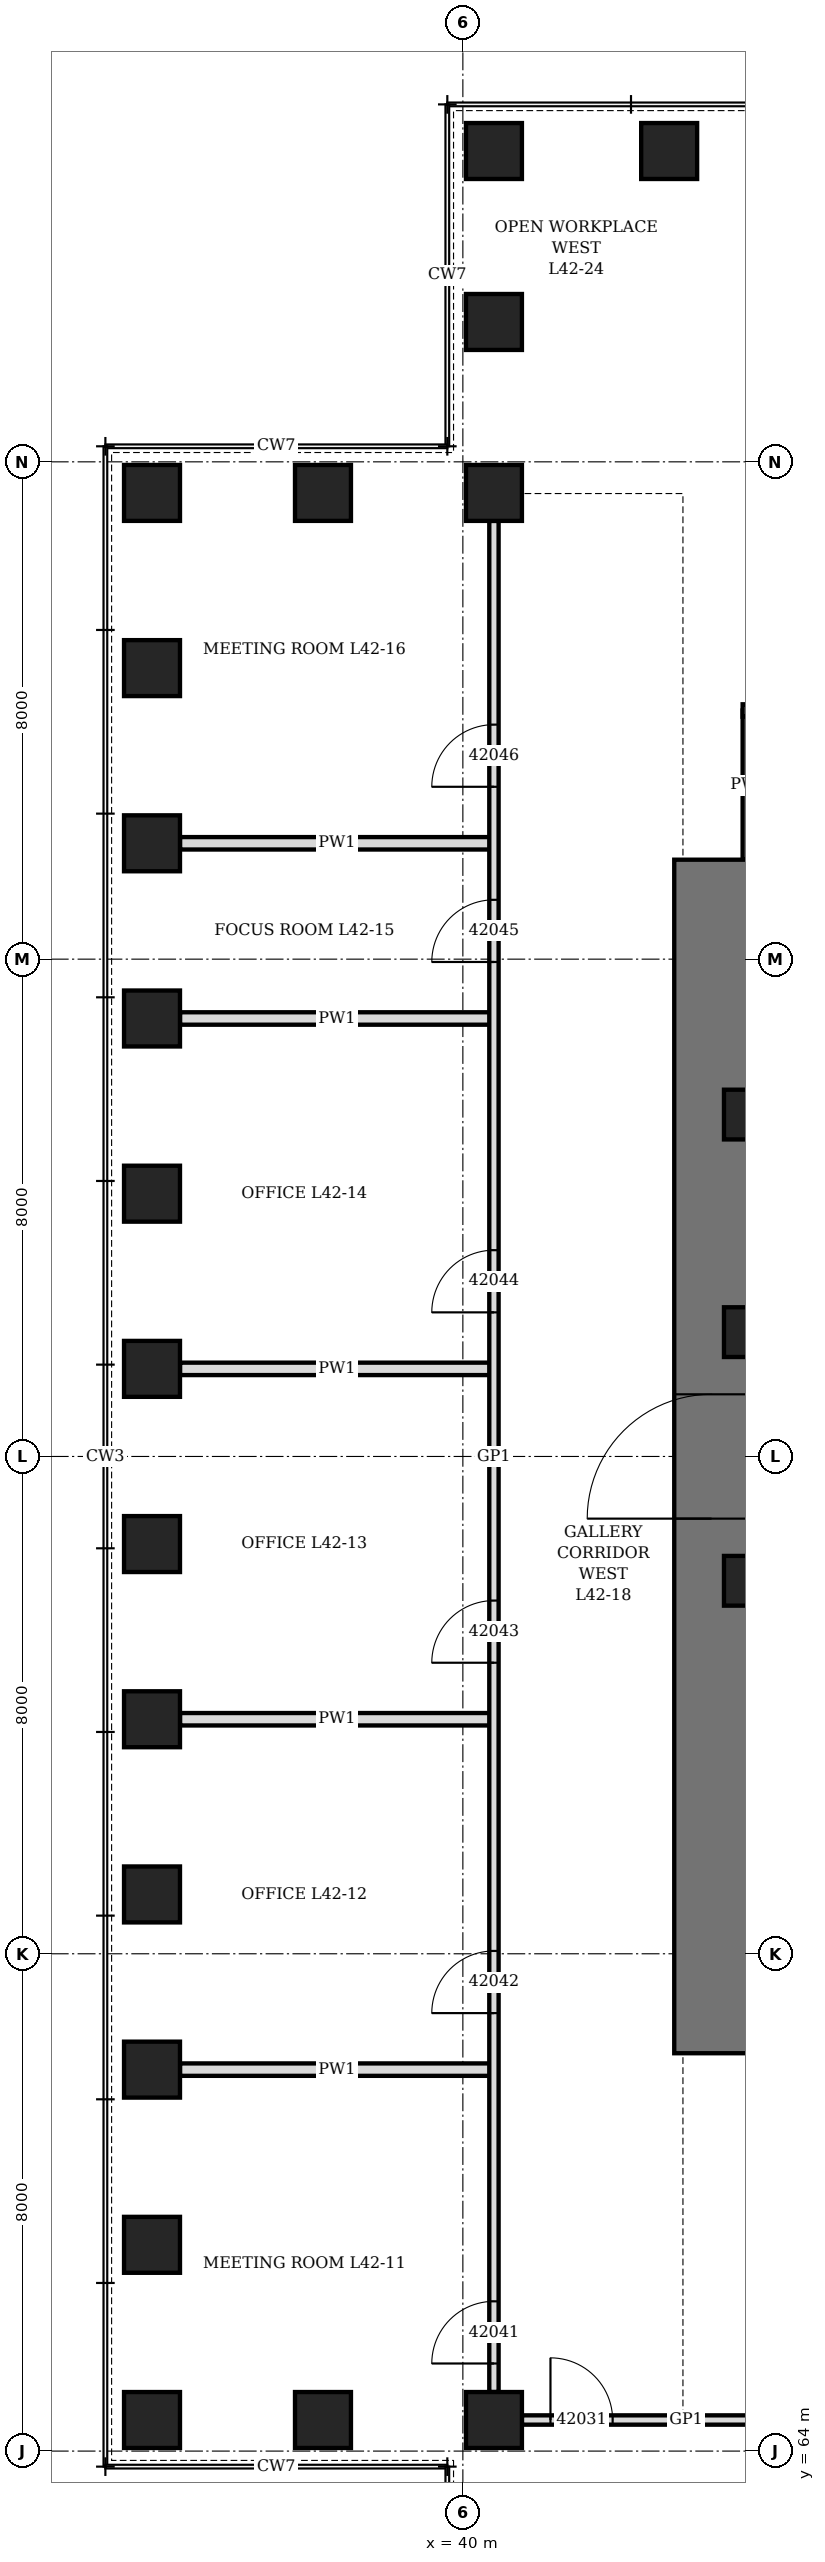
"""IFC4 building model, lengths in metres.
Left out: names, types, materials, properties, quantities, classifications, styles, units other than length and angle.
Written with IfcOpenShell. Run it as: python <this file> out.ifc"""

import sys

from ifc_helpers import new_model, si_unit, direction, frame, frame_2d, origin, origin_2d, place, context, subcontext, project, spatial, rectangle, hollow_rectangle, extrude, element, fill, save


model = new_model("IFC4")
c1 = context("Model", 3, precision=1e-05, world=origin(), true_north=direction((0.0, 1.0)))
c2 = subcontext(c1, "Body", "Model", "MODEL_VIEW")
j1 = project(units=[si_unit("LENGTHUNIT", "METRE"), si_unit("PLANEANGLEUNIT", "RADIAN")], contexts=[c1])
p1 = place(None, origin())
s1 = spatial("IfcSite", under=j1, at=p1, CompositionType="ELEMENT")
p2 = place(p1, origin())
s2 = spatial("IfcBuilding", under=s1, at=p2, CompositionType="ELEMENT")
p3 = place(p2, frame((0.0, 0.0, 189.7)))
s3 = spatial("IfcBuildingStorey", under=s2, at=p3, CompositionType="ELEMENT", Elevation=189.7)
for number, where, z_axis, x_axis in (
    (1, (43.318, 101.0, 0.0), (0.0, 0.0, 1.0), (1.0, 0.0, 0.0)),
    (2, (40.5, 101.0, 0.0), (0.0, 0.0, 1.0), (0.0, 1.0, 0.0)),
    (3, (40.5, 98.25, 0.0), (0.0, 0.0, 1.0), (0.0, 1.0, 0.0)),
    (4, (40.5, 95.5, 0.0), (0.0, 0.0, 1.0), (1.0, 0.0, 0.0)),
    (5, (37.75, 95.5, 0.0), (0.0, 0.0, 1.0), (1.0, 0.0, 0.0)),
    (6, (35.0, 95.5, 0.0), (0.0, 0.0, 1.0), (0.0, 1.0, 0.0)),
    (7, (35.0, 92.682, 0.0), (0.0, 0.0, 1.0), (0.0, 1.0, 0.0)),
    (8, (35.0, 89.864, 0.0), (0.0, 0.0, 1.0), (0.0, 1.0, 0.0)),
    (9, (35.0, 87.045, 0.0), (0.0, 0.0, 1.0), (0.0, 1.0, 0.0)),
    (10, (35.0, 84.227, 0.0), (0.0, 0.0, 1.0), (0.0, 1.0, 0.0)),
    (11, (35.0, 81.409, 0.0), (0.0, 0.0, 1.0), (0.0, 1.0, 0.0)),
    (12, (35.0, 78.591, 0.0), (0.0, 0.0, 1.0), (0.0, 1.0, 0.0)),
    (13, (35.0, 75.773, 0.0), (0.0, 0.0, 1.0), (0.0, 1.0, 0.0)),
    (14, (35.0, 72.955, 0.0), (0.0, 0.0, 1.0), (0.0, 1.0, 0.0)),
    (15, (35.0, 70.136, 0.0), (0.0, 0.0, 1.0), (0.0, 1.0, 0.0)),
    (16, (35.0, 67.318, 0.0), (0.0, 0.0, 1.0), (0.0, 1.0, 0.0)),
    (17, (35.0, 64.5, 0.0), (0.0, 0.0, 1.0), (1.0, 0.0, 0.0)),
    (18, (37.75, 64.5, 0.0), (0.0, 0.0, 1.0), (1.0, 0.0, 0.0)),
    (19, (40.5, 64.5, 0.0), (0.0, 0.0, 1.0), (0.0, 1.0, 0.0)),
):
    element("IfcColumn", number, at=place(p3, frame(where, z_axis=z_axis, x_axis=x_axis)), inside=s3, PredefinedType="COLUMN", context=c2, shape_type="SweptSolid", body=[
        extrude(hollow_rectangle(XDim=0.9, YDim=0.9, WallThickness=0.12, at=origin_2d()), origin(), (0.0, 0.0, 1.0), 4.2),
    ])
p4 = place(p3, frame((44.0, 70.4, 0.0), z_axis=(0.0, 0.0, 1.0), x_axis=(0.0, 1.0, 0.0)))
e20 = element("IfcWall", 20, at=p4, inside=s3, PredefinedType="SHEAR", context=c2, shape_type="SweptSolid", body=[
    extrude(rectangle(XDim=19.2, YDim=1.2, at=frame_2d((9.6, 0.0))), origin(), (0.0, 0.0, 1.0), 4.2),
])
p5 = place(p4, frame((8.6, 0.0, 0.0)))
e21 = element("IfcOpeningElement", 21, at=p5, cuts=e20, PredefinedType="OPENING", context=c2, shape_type="SweptSolid", body=[
    extrude(rectangle(XDim=2.0, YDim=2.4, at=frame_2d((1.0, 1.2))), frame((0.0, 0.61, 0.0), z_axis=(0.0, -1.0, 0.0), x_axis=(1.0, 0.0, 0.0)), (0.0, 0.0, 1.0), 1.22),
])
for number, where, z_axis, x_axis in (
    (22, (44.6, 78.0, 0.0), (0.0, 0.0, 1.0), (1.0, 0.0, 0.0)),
    (23, (44.6, 82.0, 0.0), (0.0, 0.0, 1.0), (1.0, 0.0, 0.0)),
    (24, (44.6, 85.5, 0.0), (0.0, 0.0, 1.0), (1.0, 0.0, 0.0)),
):
    element("IfcColumn", number, at=place(p3, frame(where, z_axis=z_axis, x_axis=x_axis)), inside=s3, PredefinedType="COLUMN", context=c2, shape_type="SweptSolid", body=[
        extrude(hollow_rectangle(XDim=0.8, YDim=0.8, WallThickness=0.1, at=origin_2d()), origin(), (0.0, 0.0, 1.0), 4.2),
    ])
for number, where, z_axis, x_axis in (
    (25, (35.45, 70.136, 0.0), (0.0, 0.0, 1.0), (1.0, 0.0, 0.0)),
    (26, (35.45, 75.773, 0.0), (0.0, 0.0, 1.0), (1.0, 0.0, 0.0)),
    (27, (35.45, 81.409, 0.0), (0.0, 0.0, 1.0), (1.0, 0.0, 0.0)),
    (28, (35.45, 87.045, 0.0), (0.0, 0.0, 1.0), (1.0, 0.0, 0.0)),
    (29, (35.45, 89.864, 0.0), (0.0, 0.0, 1.0), (1.0, 0.0, 0.0)),
):
    element("IfcWall", number, at=place(p3, frame(where, z_axis=z_axis, x_axis=x_axis)), inside=s3, PredefinedType="PARTITIONING", context=c2, shape_type="SweptSolid", body=[
        extrude(rectangle(XDim=5.05, YDim=0.2, at=frame_2d((2.525, 0.0))), origin(), (0.0, 0.0, 1.0), 3.428),
    ])
p6 = place(p3, frame((44.6, 89.6, 0.0), z_axis=(0.0, 0.0, 1.0), x_axis=(0.0, 1.0, 0.0)))
e30 = element("IfcWall", 30, at=p6, inside=s3, PredefinedType="PARTITIONING", context=c2, shape_type="SweptSolid", body=[
    extrude(rectangle(XDim=2.4, YDim=0.2, at=frame_2d((1.2, 0.0))), origin(), (0.0, 0.0, 1.0), 4.04),
])
p7 = place(p3, frame((40.95, 64.5, 0.0), z_axis=(0.0, 0.0, 1.0), x_axis=(1.0, 0.0, 0.0)))
e31 = element("IfcWall", 31, at=p7, inside=s3, PredefinedType="PARTITIONING", context=c2, shape_type="SweptSolid", body=[
    extrude(rectangle(XDim=5.286, YDim=0.15, at=frame_2d((2.643, 0.0))), origin(), (0.0, 0.0, 1.0), 4.04),
])
p8 = place(p7, frame((0.459, 0.0, 0.0)))
e32 = element("IfcOpeningElement", 32, at=p8, cuts=e31, PredefinedType="OPENING", context=c2, shape_type="SweptSolid", body=[
    extrude(rectangle(XDim=1.0, YDim=2.4, at=frame_2d((0.5, 1.2))), frame((0.0, 0.085, 0.0), z_axis=(0.0, -1.0, 0.0), x_axis=(1.0, 0.0, 0.0)), (0.0, 0.0, 1.0), 0.17),
])
p9 = place(p3, frame((44.5, 92.0, 0.0), z_axis=(0.0, 0.0, 1.0), x_axis=(1.0, 0.0, 0.0)))
e33 = element("IfcWall", 33, at=p9, inside=s3, PredefinedType="PARTITIONING", context=c2, shape_type="SweptSolid", body=[
    extrude(rectangle(XDim=6.4, YDim=0.2, at=frame_2d((3.2, 0.0))), origin(), (0.0, 0.0, 1.0), 4.04),
])
p10 = place(p9, frame((2.7, 0.0, 0.0)))
e34 = element("IfcOpeningElement", 34, at=p10, cuts=e33, PredefinedType="OPENING", context=c2, shape_type="SweptSolid", body=[
    extrude(rectangle(XDim=1.0, YDim=2.1, at=frame_2d((0.5, 1.05))), frame((0.0, 0.11, 0.0), z_axis=(0.0, -1.0, 0.0), x_axis=(1.0, 0.0, 0.0)), (0.0, 0.0, 1.0), 0.22),
])
p11 = place(p3, frame((40.5, 64.95, 0.0), z_axis=(0.0, 0.0, 1.0), x_axis=(0.0, 1.0, 0.0)))
e35 = element("IfcWall", 35, at=p11, inside=s3, PredefinedType="PARTITIONING", context=c2, shape_type="SweptSolid", body=[
    extrude(rectangle(XDim=30.1, YDim=0.15, at=frame_2d((15.05, 0.0))), origin(), (0.0, 0.0, 1.0), 4.04),
])
p12 = place(p11, frame((0.459, 0.0, 0.0)))
e36 = element("IfcOpeningElement", 36, at=p12, cuts=e35, PredefinedType="OPENING", context=c2, shape_type="SweptSolid", body=[
    extrude(rectangle(XDim=1.0, YDim=2.4, at=frame_2d((0.5, 1.2))), frame((0.0, 0.085, 0.0), z_axis=(0.0, -1.0, 0.0), x_axis=(1.0, 0.0, 0.0)), (0.0, 0.0, 1.0), 0.17),
])
p13 = place(p11, frame((6.095, 0.0, 0.0)))
e37 = element("IfcOpeningElement", 37, at=p13, cuts=e35, PredefinedType="OPENING", context=c2, shape_type="SweptSolid", body=[
    extrude(rectangle(XDim=1.0, YDim=2.1, at=frame_2d((0.5, 1.05))), frame((0.0, 0.085, 0.0), z_axis=(0.0, -1.0, 0.0), x_axis=(1.0, 0.0, 0.0)), (0.0, 0.0, 1.0), 0.17),
])
p14 = place(p11, frame((11.732, 0.0, 0.0)))
e38 = element("IfcOpeningElement", 38, at=p14, cuts=e35, PredefinedType="OPENING", context=c2, shape_type="SweptSolid", body=[
    extrude(rectangle(XDim=1.0, YDim=2.1, at=frame_2d((0.5, 1.05))), frame((0.0, 0.085, 0.0), z_axis=(0.0, -1.0, 0.0), x_axis=(1.0, 0.0, 0.0)), (0.0, 0.0, 1.0), 0.17),
])
p15 = place(p11, frame((17.368, 0.0, 0.0)))
e39 = element("IfcOpeningElement", 39, at=p15, cuts=e35, PredefinedType="OPENING", context=c2, shape_type="SweptSolid", body=[
    extrude(rectangle(XDim=1.0, YDim=2.1, at=frame_2d((0.5, 1.05))), frame((0.0, 0.085, 0.0), z_axis=(0.0, -1.0, 0.0), x_axis=(1.0, 0.0, 0.0)), (0.0, 0.0, 1.0), 0.17),
])
p16 = place(p11, frame((23.004, 0.0, 0.0)))
e40 = element("IfcOpeningElement", 40, at=p16, cuts=e35, PredefinedType="OPENING", context=c2, shape_type="SweptSolid", body=[
    extrude(rectangle(XDim=1.0, YDim=2.4, at=frame_2d((0.5, 1.2))), frame((0.0, 0.085, 0.0), z_axis=(0.0, -1.0, 0.0), x_axis=(1.0, 0.0, 0.0)), (0.0, 0.0, 1.0), 0.17),
])
p17 = place(p11, frame((25.823, 0.0, 0.0)))
e41 = element("IfcOpeningElement", 41, at=p17, cuts=e35, PredefinedType="OPENING", context=c2, shape_type="SweptSolid", body=[
    extrude(rectangle(XDim=1.0, YDim=2.4, at=frame_2d((0.5, 1.2))), frame((0.0, 0.085, 0.0), z_axis=(0.0, -1.0, 0.0), x_axis=(1.0, 0.0, 0.0)), (0.0, 0.0, 1.0), 0.17),
])
p18 = place(p5, origin())
e42 = element("IfcDoor", 42, at=p18, inside=s3, OperationType="DOUBLE_DOOR_SINGLE_SWING", PredefinedType="DOOR", context=c2, shape_type="SweptSolid", body=[
    extrude(rectangle(XDim=2.0, YDim=2.4, at=frame_2d((1.0, 1.2))), frame((0.0, 0.35, 0.0), z_axis=(0.0, -1.0, 0.0), x_axis=(1.0, 0.0, 0.0)), (0.0, 0.0, 1.0), 0.7),
])
fill(e21, e42)
p19 = place(p8, origin())
e43 = element("IfcDoor", 43, at=p19, inside=s3, OperationType="SINGLE_SWING_RIGHT", PredefinedType="DOOR", context=c2, shape_type="SweptSolid", body=[
    extrude(rectangle(XDim=1.0, YDim=2.4, at=frame_2d((0.5, 1.2))), frame((0.0, 0.075, 0.0), z_axis=(0.0, -1.0, 0.0), x_axis=(1.0, 0.0, 0.0)), (0.0, 0.0, 1.0), 0.149),
])
fill(e32, e43)
p20 = place(p12, origin())
e44 = element("IfcDoor", 44, at=p20, inside=s3, OperationType="SINGLE_SWING_RIGHT", PredefinedType="DOOR", context=c2, shape_type="SweptSolid", body=[
    extrude(rectangle(XDim=1.0, YDim=2.4, at=frame_2d((0.5, 1.2))), frame((0.0, 0.075, 0.0), z_axis=(0.0, -1.0, 0.0), x_axis=(1.0, 0.0, 0.0)), (0.0, 0.0, 1.0), 0.149),
])
fill(e36, e44)
p21 = place(p13, origin())
e45 = element("IfcDoor", 45, at=p21, inside=s3, OperationType="SINGLE_SWING_LEFT", PredefinedType="DOOR", context=c2, shape_type="SweptSolid", body=[
    extrude(rectangle(XDim=1.0, YDim=2.1, at=frame_2d((0.5, 1.05))), frame((0.0, 0.075, 0.0), z_axis=(0.0, -1.0, 0.0), x_axis=(1.0, 0.0, 0.0)), (0.0, 0.0, 1.0), 0.149),
])
fill(e37, e45)
p22 = place(p14, origin())
e46 = element("IfcDoor", 46, at=p22, inside=s3, OperationType="SINGLE_SWING_LEFT", PredefinedType="DOOR", context=c2, shape_type="SweptSolid", body=[
    extrude(rectangle(XDim=1.0, YDim=2.1, at=frame_2d((0.5, 1.05))), frame((0.0, 0.075, 0.0), z_axis=(0.0, -1.0, 0.0), x_axis=(1.0, 0.0, 0.0)), (0.0, 0.0, 1.0), 0.149),
])
fill(e38, e46)
p23 = place(p15, origin())
e47 = element("IfcDoor", 47, at=p23, inside=s3, OperationType="SINGLE_SWING_LEFT", PredefinedType="DOOR", context=c2, shape_type="SweptSolid", body=[
    extrude(rectangle(XDim=1.0, YDim=2.1, at=frame_2d((0.5, 1.05))), frame((0.0, 0.075, 0.0), z_axis=(0.0, -1.0, 0.0), x_axis=(1.0, 0.0, 0.0)), (0.0, 0.0, 1.0), 0.149),
])
fill(e39, e47)
p24 = place(p16, origin())
e48 = element("IfcDoor", 48, at=p24, inside=s3, OperationType="SINGLE_SWING_RIGHT", PredefinedType="DOOR", context=c2, shape_type="SweptSolid", body=[
    extrude(rectangle(XDim=1.0, YDim=2.4, at=frame_2d((0.5, 1.2))), frame((0.0, 0.075, 0.0), z_axis=(0.0, -1.0, 0.0), x_axis=(1.0, 0.0, 0.0)), (0.0, 0.0, 1.0), 0.149),
])
fill(e40, e48)
p25 = place(p17, origin())
e49 = element("IfcDoor", 49, at=p25, inside=s3, OperationType="SINGLE_SWING_RIGHT", PredefinedType="DOOR", context=c2, shape_type="SweptSolid", body=[
    extrude(rectangle(XDim=1.0, YDim=2.4, at=frame_2d((0.5, 1.2))), frame((0.0, 0.075, 0.0), z_axis=(0.0, -1.0, 0.0), x_axis=(1.0, 0.0, 0.0)), (0.0, 0.0, 1.0), 0.149),
])
fill(e41, e49)
save(model, sys.argv[1])
